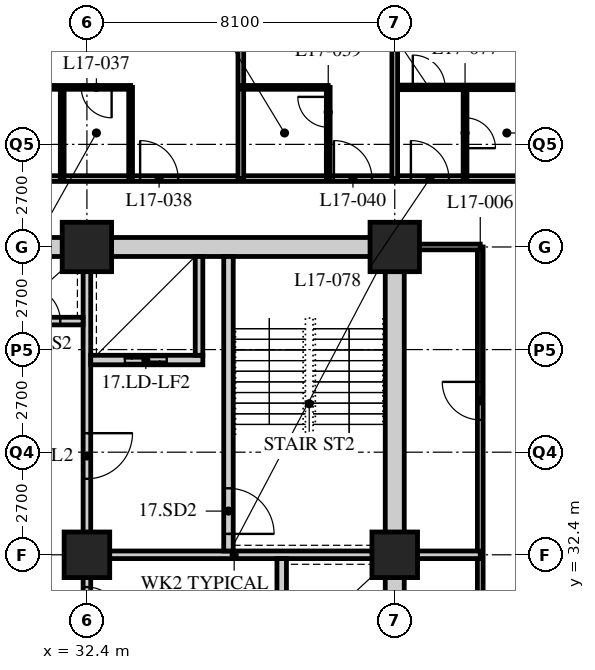
"""IFC4 building model, lengths in metres.
Left out: names, types, materials, properties, quantities, classifications, styles, units other than length and angle.
Written with IfcOpenShell. Run it as: python <this file> out.ifc"""

import sys

from ifc_helpers import new_model, si_unit, direction, frame, frame_2d, origin, origin_2d, place, context, subcontext, project, spatial, rectangle, hollow_rectangle, extrude, element, fill, save


model = new_model("IFC4")
c1 = context("Model", 3, precision=1e-05, world=origin(), true_north=direction((0.0, 1.0)))
c2 = subcontext(c1, "Body", "Model", "MODEL_VIEW")
j1 = project(units=[si_unit("LENGTHUNIT", "METRE"), si_unit("PLANEANGLEUNIT", "RADIAN")], contexts=[c1])
p1 = place(None, origin())
s1 = spatial("IfcSite", under=j1, at=p1, CompositionType="ELEMENT")
p2 = place(p1, origin())
s2 = spatial("IfcBuilding", under=s1, at=p2, CompositionType="ELEMENT")
p3 = place(p2, frame((0.0, 0.0, 70.4)))
s3 = spatial("IfcBuildingStorey", under=s2, at=p3, CompositionType="ELEMENT", Elevation=70.4)
p4 = place(p3, frame((32.4, 32.4, 0.0), z_axis=(0.0, 0.0, 1.0), x_axis=(1.0, 0.0, 0.0)))
e1 = element("IfcColumn", 1, at=p4, inside=s3, PredefinedType="COLUMN", context=c2, shape_type="SweptSolid", body=[
    extrude(hollow_rectangle(XDim=1.2, YDim=1.2, WallThickness=0.12, at=origin_2d()), origin(), (0.0, 0.0, 1.0), 3.4),
])
p5 = place(p3, frame((32.4, 40.5, 0.0), z_axis=(0.0, 0.0, 1.0), x_axis=(1.0, 0.0, 0.0)))
e2 = element("IfcColumn", 2, at=p5, inside=s3, PredefinedType="COLUMN", context=c2, shape_type="SweptSolid", body=[
    extrude(hollow_rectangle(XDim=1.3, YDim=1.3, WallThickness=0.13, at=origin_2d()), origin(), (0.0, 0.0, 1.0), 3.4),
])
p6 = place(p3, frame((40.5, 32.4, 0.0), z_axis=(0.0, 0.0, 1.0), x_axis=(1.0, 0.0, 0.0)))
e3 = element("IfcColumn", 3, at=p6, inside=s3, PredefinedType="COLUMN", context=c2, shape_type="SweptSolid", body=[
    extrude(hollow_rectangle(XDim=1.2, YDim=1.2, WallThickness=0.12, at=origin_2d()), origin(), (0.0, 0.0, 1.0), 3.4),
])
p7 = place(p3, frame((40.5, 40.5, 0.0), z_axis=(0.0, 0.0, 1.0), x_axis=(1.0, 0.0, 0.0)))
e4 = element("IfcColumn", 4, at=p7, inside=s3, PredefinedType="COLUMN", context=c2, shape_type="SweptSolid", body=[
    extrude(hollow_rectangle(XDim=1.3, YDim=1.3, WallThickness=0.13, at=origin_2d()), origin(), (0.0, 0.0, 1.0), 3.4),
])
p8 = place(p3, frame((8.1, 42.3, 0.0), z_axis=(0.0, 0.0, 1.0), x_axis=(1.0, 0.0, 0.0)))
e5 = element("IfcWall", 5, at=p8, inside=s3, PredefinedType="PARTITIONING", context=c2, shape_type="SweptSolid", body=[
    extrude(rectangle(XDim=36.45, YDim=0.15, at=frame_2d((18.225, 0.0))), origin(), (0.0, 0.0, 1.0), 3.19),
])
p9 = place(p8, frame((9.5, 0.0, 0.0)))
e6 = element("IfcOpeningElement", 6, at=p9, cuts=e5, PredefinedType="OPENING", context=c2, shape_type="SweptSolid", body=[
    extrude(rectangle(XDim=1.0, YDim=2.1, at=frame_2d((0.5, 1.05))), frame((0.0, 0.085, 0.0), z_axis=(0.0, -1.0, 0.0), x_axis=(1.0, 0.0, 0.0)), (0.0, 0.0, 1.0), 0.17),
])
p10 = place(p8, frame((14.6, 0.0, 0.0)))
e7 = element("IfcOpeningElement", 7, at=p10, cuts=e5, PredefinedType="OPENING", context=c2, shape_type="SweptSolid", body=[
    extrude(rectangle(XDim=1.0, YDim=2.1, at=frame_2d((0.5, 1.05))), frame((0.0, 0.085, 0.0), z_axis=(0.0, -1.0, 0.0), x_axis=(1.0, 0.0, 0.0)), (0.0, 0.0, 1.0), 0.17),
])
p11 = place(p8, frame((18.65, 0.0, 0.0)))
e8 = element("IfcOpeningElement", 8, at=p11, cuts=e5, PredefinedType="OPENING", context=c2, shape_type="SweptSolid", body=[
    extrude(rectangle(XDim=1.0, YDim=2.1, at=frame_2d((0.5, 1.05))), frame((0.0, 0.085, 0.0), z_axis=(0.0, -1.0, 0.0), x_axis=(1.0, 0.0, 0.0)), (0.0, 0.0, 1.0), 0.17),
])
p12 = place(p8, frame((25.7, 0.0, 0.0)))
e9 = element("IfcOpeningElement", 9, at=p12, cuts=e5, PredefinedType="OPENING", context=c2, shape_type="SweptSolid", body=[
    extrude(rectangle(XDim=1.0, YDim=2.1, at=frame_2d((0.5, 1.05))), frame((0.0, 0.085, 0.0), z_axis=(0.0, -1.0, 0.0), x_axis=(1.0, 0.0, 0.0)), (0.0, 0.0, 1.0), 0.17),
])
p13 = place(p8, frame((30.8, 0.0, 0.0)))
e10 = element("IfcOpeningElement", 10, at=p13, cuts=e5, PredefinedType="OPENING", context=c2, shape_type="SweptSolid", body=[
    extrude(rectangle(XDim=1.0, YDim=2.1, at=frame_2d((0.5, 1.05))), frame((0.0, 0.085, 0.0), z_axis=(0.0, -1.0, 0.0), x_axis=(1.0, 0.0, 0.0)), (0.0, 0.0, 1.0), 0.17),
])
p14 = place(p8, frame((32.825, 0.0, 0.0)))
e11 = element("IfcOpeningElement", 11, at=p14, cuts=e5, PredefinedType="OPENING", context=c2, shape_type="SweptSolid", body=[
    extrude(rectangle(XDim=1.0, YDim=2.1, at=frame_2d((0.5, 1.05))), frame((0.0, 0.085, 0.0), z_axis=(0.0, -1.0, 0.0), x_axis=(1.0, 0.0, 0.0)), (0.0, 0.0, 1.0), 0.17),
])
p15 = place(p8, frame((2.625, 0.0, 0.0)))
e12 = element("IfcOpeningElement", 12, at=p15, cuts=e5, PredefinedType="OPENING", context=c2, shape_type="SweptSolid", body=[
    extrude(rectangle(XDim=1.0, YDim=2.1, at=frame_2d((0.5, 1.05))), frame((0.0, 0.085, 0.0), z_axis=(0.0, -1.0, 0.0), x_axis=(1.0, 0.0, 0.0)), (0.0, 0.0, 1.0), 0.17),
])
p16 = place(p3, frame((42.75, 13.95, 0.0), z_axis=(0.0, 0.0, 1.0), x_axis=(0.0, 1.0, 0.0)))
e13 = element("IfcWall", 13, at=p16, inside=s3, PredefinedType="PARTITIONING", context=c2, shape_type="SweptSolid", body=[
    extrude(rectangle(XDim=26.55, YDim=0.15, at=frame_2d((13.275, 0.0))), origin(), (0.0, 0.0, 1.0), 3.19),
])
p17 = place(p16, frame((13.9, 0.0, 0.0)))
e14 = element("IfcOpeningElement", 14, at=p17, cuts=e13, PredefinedType="OPENING", context=c2, shape_type="SweptSolid", body=[
    extrude(rectangle(XDim=1.0, YDim=2.1, at=frame_2d((0.5, 1.05))), frame((0.0, 0.085, 0.0), z_axis=(0.0, -1.0, 0.0), x_axis=(1.0, 0.0, 0.0)), (0.0, 0.0, 1.0), 0.17),
])
p18 = place(p16, frame((22.0, 0.0, 0.0)))
e15 = element("IfcOpeningElement", 15, at=p18, cuts=e13, PredefinedType="OPENING", context=c2, shape_type="SweptSolid", body=[
    extrude(rectangle(XDim=1.0, YDim=2.1, at=frame_2d((0.5, 1.05))), frame((0.0, 0.085, 0.0), z_axis=(0.0, -1.0, 0.0), x_axis=(1.0, 0.0, 0.0)), (0.0, 0.0, 1.0), 0.17),
])
p19 = place(p3, frame((42.75, 40.5, 0.0), z_axis=(0.0, 0.0, 1.0), x_axis=(-1.0, 0.0, 0.0)))
e16 = element("IfcWall", 16, at=p19, inside=s3, PredefinedType="PARTITIONING", context=c2, shape_type="SweptSolid", body=[
    extrude(rectangle(XDim=2.05, YDim=0.15, at=frame_2d((1.025, 0.0))), origin(), (0.0, 0.0, 1.0), 2.578),
])
p20 = place(p3, frame((40.5, 32.4, 0.0), z_axis=(0.0, 0.0, 1.0), x_axis=(1.0, 0.0, 0.0)))
e17 = element("IfcWall", 17, at=p20, inside=s3, PredefinedType="SOLIDWALL", context=c2, shape_type="SweptSolid", body=[
    extrude(rectangle(XDim=2.25, YDim=0.2, at=frame_2d((1.125, 0.0))), origin(), (0.0, 0.0, 1.0), 2.578),
])
p21 = place(p3, frame((28.35, 44.7, 0.0), z_axis=(0.0, 0.0, 1.0), x_axis=(1.0, 0.0, 0.0)))
e18 = element("IfcWall", 18, at=p21, inside=s3, PredefinedType="PARTITIONING", context=c2, shape_type="SweptSolid", body=[
    extrude(rectangle(XDim=5.2, YDim=0.1, at=frame_2d((2.6, 0.0))), origin(), (0.0, 0.0, 1.0), 3.19),
])
p22 = place(p21, frame((1.3, 0.0, 0.0)))
e19 = element("IfcOpeningElement", 19, at=p22, cuts=e18, PredefinedType="OPENING", context=c2, shape_type="SweptSolid", body=[
    extrude(rectangle(XDim=0.8, YDim=2.1, at=frame_2d((0.4, 1.05))), frame((0.0, 0.06, 0.0), z_axis=(0.0, -1.0, 0.0), x_axis=(1.0, 0.0, 0.0)), (0.0, 0.0, 1.0), 0.12),
])
p23 = place(p21, frame((3.9, 0.0, 0.0)))
e20 = element("IfcOpeningElement", 20, at=p23, cuts=e18, PredefinedType="OPENING", context=c2, shape_type="SweptSolid", body=[
    extrude(rectangle(XDim=0.8, YDim=2.1, at=frame_2d((0.4, 1.05))), frame((0.0, 0.06, 0.0), z_axis=(0.0, -1.0, 0.0), x_axis=(1.0, 0.0, 0.0)), (0.0, 0.0, 1.0), 0.12),
])
for number, where, z_axis, x_axis in (
    (21, (31.75, 42.3, 0.0), (0.0, 0.0, 1.0), (0.0, 1.0, 0.0)),
    (22, (33.55, 42.3, 0.0), (0.0, 0.0, 1.0), (0.0, 1.0, 0.0)),
):
    element("IfcWall", number, at=place(p3, frame(where, z_axis=z_axis, x_axis=x_axis)), inside=s3, PredefinedType="PARTITIONING", context=c2, shape_type="SweptSolid", body=[
        extrude(rectangle(XDim=2.4, YDim=0.1, at=frame_2d((1.2, 0.0))), origin(), (0.0, 0.0, 1.0), 3.19),
    ])
p24 = place(p3, frame((36.45, 42.3, 0.0), z_axis=(0.0, 0.0, 1.0), x_axis=(0.0, 1.0, 0.0)))
e23 = element("IfcWall", 23, at=p24, inside=s3, PredefinedType="PARTITIONING", context=c2, shape_type="SweptSolid", body=[
    extrude(rectangle(XDim=6.0, YDim=0.15, at=frame_2d((3.0, 0.0))), origin(), (0.0, 0.0, 1.0), 3.19),
])
p25 = place(p3, frame((36.45, 44.7, 0.0), z_axis=(0.0, 0.0, 1.0), x_axis=(1.0, 0.0, 0.0)))
e24 = element("IfcWall", 24, at=p25, inside=s3, PredefinedType="PARTITIONING", context=c2, shape_type="SweptSolid", body=[
    extrude(rectangle(XDim=2.3, YDim=0.1, at=frame_2d((1.15, 0.0))), origin(), (0.0, 0.0, 1.0), 3.19),
])
p26 = place(p3, frame((38.75, 42.3, 0.0), z_axis=(0.0, 0.0, 1.0), x_axis=(0.0, 1.0, 0.0)))
e25 = element("IfcWall", 25, at=p26, inside=s3, PredefinedType="PARTITIONING", context=c2, shape_type="SweptSolid", body=[
    extrude(rectangle(XDim=2.4, YDim=0.1, at=frame_2d((1.2, 0.0))), origin(), (0.0, 0.0, 1.0), 3.19),
])
p27 = place(p26, frame((1.35, 0.0, 0.0)))
e26 = element("IfcOpeningElement", 26, at=p27, cuts=e25, PredefinedType="OPENING", context=c2, shape_type="SweptSolid", body=[
    extrude(rectangle(XDim=0.8, YDim=2.1, at=frame_2d((0.4, 1.05))), frame((0.0, 0.06, 0.0), z_axis=(0.0, -1.0, 0.0), x_axis=(1.0, 0.0, 0.0)), (0.0, 0.0, 1.0), 0.12),
])
p28 = place(p3, frame((40.5, 44.7, 0.0), z_axis=(0.0, 0.0, 1.0), x_axis=(1.0, 0.0, 0.0)))
e27 = element("IfcWall", 27, at=p28, inside=s3, PredefinedType="PARTITIONING", context=c2, shape_type="SweptSolid", body=[
    extrude(rectangle(XDim=4.05, YDim=0.12, at=frame_2d((2.025, 0.0))), origin(), (0.0, 0.0, 1.0), 3.19),
])
p29 = place(p28, frame((0.475, 0.0, 0.0)))
e28 = element("IfcOpeningElement", 28, at=p29, cuts=e27, PredefinedType="OPENING", context=c2, shape_type="SweptSolid", body=[
    extrude(rectangle(XDim=0.85, YDim=2.1, at=frame_2d((0.425, 1.05))), frame((0.0, 0.07, 0.0), z_axis=(0.0, -1.0, 0.0), x_axis=(1.0, 0.0, 0.0)), (0.0, 0.0, 1.0), 0.14),
])
p30 = place(p3, frame((42.35, 42.3, 0.0), z_axis=(0.0, 0.0, 1.0), x_axis=(0.0, 1.0, 0.0)))
e29 = element("IfcWall", 29, at=p30, inside=s3, PredefinedType="PARTITIONING", context=c2, shape_type="SweptSolid", body=[
    extrude(rectangle(XDim=2.4, YDim=0.1, at=frame_2d((1.2, 0.0))), origin(), (0.0, 0.0, 1.0), 3.19),
])
p31 = place(p30, frame((0.8, 0.0, 0.0)))
e30 = element("IfcOpeningElement", 30, at=p31, cuts=e29, PredefinedType="OPENING", context=c2, shape_type="SweptSolid", body=[
    extrude(rectangle(XDim=0.8, YDim=2.1, at=frame_2d((0.4, 1.05))), frame((0.0, 0.06, 0.0), z_axis=(0.0, -1.0, 0.0), x_axis=(1.0, 0.0, 0.0)), (0.0, 0.0, 1.0), 0.12),
])
p32 = place(p3, frame((40.5, 42.3, 0.0), z_axis=(0.0, 0.0, 1.0), x_axis=(0.0, 1.0, 0.0)))
e31 = element("IfcWall", 31, at=p32, inside=s3, PredefinedType="PARTITIONING", context=c2, shape_type="SweptSolid", body=[
    extrude(rectangle(XDim=6.0, YDim=0.15, at=frame_2d((3.0, 0.0))), origin(), (0.0, 0.0, 1.0), 2.578),
])
p33 = place(p3, frame((15.95, 40.5, 0.0), z_axis=(0.0, 0.0, 1.0), x_axis=(1.0, 0.0, 0.0)))
e32 = element("IfcWall", 32, at=p33, inside=s3, PredefinedType="SOLIDWALL", context=c2, shape_type="SweptSolid", body=[
    extrude(rectangle(XDim=24.8, YDim=0.5, at=frame_2d((12.4, 0.0))), origin(), (0.0, 0.0, 1.0), 2.54),
])
p34 = place(p33, frame((11.5, 0.0, 0.0)))
e33 = element("IfcOpeningElement", 33, at=p34, cuts=e32, PredefinedType="OPENING", context=c2, shape_type="SweptSolid", body=[
    extrude(rectangle(XDim=1.8, YDim=2.4, at=frame_2d((0.9, 1.2))), frame((0.0, 0.26, 0.0), z_axis=(0.0, -1.0, 0.0), x_axis=(1.0, 0.0, 0.0)), (0.0, 0.0, 1.0), 0.52),
])
p35 = place(p3, frame((40.5, 24.55, 0.0), z_axis=(0.0, 0.0, 1.0), x_axis=(0.0, 1.0, 0.0)))
e34 = element("IfcWall", 34, at=p35, inside=s3, PredefinedType="SOLIDWALL", context=c2, shape_type="SweptSolid", body=[
    extrude(rectangle(XDim=15.7, YDim=0.5, at=frame_2d((7.85, 0.0))), origin(), (0.0, 0.0, 1.0), 2.578),
])
p36 = place(p3, frame((32.3, 32.4, 0.0), z_axis=(0.0, 0.0, 1.0), x_axis=(1.0, 0.0, 0.0)))
e35 = element("IfcWall", 35, at=p36, inside=s3, PredefinedType="SOLIDWALL", context=c2, shape_type="SweptSolid", body=[
    extrude(rectangle(XDim=7.95, YDim=0.2, at=frame_2d((3.975, 0.0))), origin(), (0.0, 0.0, 1.0), 2.578),
])
p37 = place(p3, frame((32.4, 32.5, 0.0), z_axis=(0.0, 0.0, 1.0), x_axis=(0.0, 1.0, 0.0)))
e36 = element("IfcWall", 36, at=p37, inside=s3, PredefinedType="SOLIDWALL", context=c2, shape_type="SweptSolid", body=[
    extrude(rectangle(XDim=7.75, YDim=0.2, at=frame_2d((3.875, 0.0))), origin(), (0.0, 0.0, 1.0), 2.578),
])
p38 = place(p37, frame((1.9, 0.0, 0.0)))
e37 = element("IfcOpeningElement", 37, at=p38, cuts=e36, PredefinedType="OPENING", context=c2, shape_type="SweptSolid", body=[
    extrude(rectangle(XDim=1.2, YDim=2.1, at=frame_2d((0.6, 1.05))), frame((0.0, 0.11, 0.0), z_axis=(0.0, -1.0, 0.0), x_axis=(1.0, 0.0, 0.0)), (0.0, 0.0, 1.0), 0.22),
])
p39 = place(p3, frame((37.525, 24.55, 0.0), z_axis=(0.0, 0.0, 1.0), x_axis=(0.0, 1.0, 0.0)))
e38 = element("IfcWall", 38, at=p39, inside=s3, PredefinedType="SOLIDWALL", context=c2, shape_type="SweptSolid", body=[
    extrude(rectangle(XDim=7.75, YDim=0.25, at=frame_2d((3.875, 0.0))), origin(), (0.0, 0.0, 1.0), 3.19),
])
p40 = place(p3, frame((36.125, 32.5, 0.0), z_axis=(0.0, 0.0, 1.0), x_axis=(0.0, 1.0, 0.0)))
e39 = element("IfcWall", 39, at=p40, inside=s3, PredefinedType="SOLIDWALL", context=c2, shape_type="SweptSolid", body=[
    extrude(rectangle(XDim=7.75, YDim=0.25, at=frame_2d((3.875, 0.0))), origin(), (0.0, 0.0, 1.0), 3.19),
])
p41 = place(p40, frame((0.45, 0.0, 0.0)))
e40 = element("IfcOpeningElement", 40, at=p41, cuts=e39, PredefinedType="OPENING", context=c2, shape_type="SweptSolid", body=[
    extrude(rectangle(XDim=1.2, YDim=2.1, at=frame_2d((0.6, 1.05))), frame((0.0, 0.135, 0.0), z_axis=(0.0, -1.0, 0.0), x_axis=(1.0, 0.0, 0.0)), (0.0, 0.0, 1.0), 0.27),
])
p42 = place(p3, frame((32.5, 37.525, 0.0), z_axis=(0.0, 0.0, 1.0), x_axis=(1.0, 0.0, 0.0)))
e41 = element("IfcWall", 41, at=p42, inside=s3, PredefinedType="SOLIDWALL", context=c2, shape_type="SweptSolid", body=[
    extrude(rectangle(XDim=2.95, YDim=0.25, at=frame_2d((1.475, 0.0))), origin(), (0.0, 0.0, 1.0), 3.19),
])
p43 = place(p42, frame((0.9, 0.0, 0.0)))
e42 = element("IfcOpeningElement", 42, at=p43, cuts=e41, PredefinedType="OPENING", context=c2, shape_type="SweptSolid", body=[
    extrude(rectangle(XDim=1.1, YDim=2.4, at=frame_2d((0.55, 1.2))), frame((0.0, 0.135, 0.0), z_axis=(0.0, -1.0, 0.0), x_axis=(1.0, 0.0, 0.0)), (0.0, 0.0, 1.0), 0.27),
])
p44 = place(p3, frame((35.35, 37.65, 0.0), z_axis=(0.0, 0.0, 1.0), x_axis=(0.0, 1.0, 0.0)))
e43 = element("IfcWall", 43, at=p44, inside=s3, PredefinedType="SOLIDWALL", context=c2, shape_type="SweptSolid", body=[
    extrude(rectangle(XDim=2.6, YDim=0.2, at=frame_2d((1.3, 0.0))), origin(), (0.0, 0.0, 1.0), 3.19),
])
p45 = place(p3, frame((30.15, 38.55, 0.0), z_axis=(0.0, 0.0, 1.0), x_axis=(1.0, 0.0, 0.0)))
e44 = element("IfcWall", 44, at=p45, inside=s3, PredefinedType="SOLIDWALL", context=c2, shape_type="SweptSolid", body=[
    extrude(rectangle(XDim=2.15, YDim=0.2, at=frame_2d((1.075, 0.0))), origin(), (0.0, 0.0, 1.0), 3.19),
])
p46 = place(p45, frame((0.65, 0.0, 0.0)))
e45 = element("IfcOpeningElement", 45, at=p46, cuts=e44, PredefinedType="OPENING", context=c2, shape_type="SweptSolid", body=[
    extrude(rectangle(XDim=0.9, YDim=2.1, at=frame_2d((0.45, 1.05))), frame((0.0, 0.11, 0.0), z_axis=(0.0, -1.0, 0.0), x_axis=(1.0, 0.0, 0.0)), (0.0, 0.0, 1.0), 0.22),
])
p47 = place(p3, frame((32.4, 24.55, 0.0), z_axis=(0.0, 0.0, 1.0), x_axis=(0.0, 1.0, 0.0)))
e46 = element("IfcWall", 46, at=p47, inside=s3, PredefinedType="PARTITIONING", context=c2, shape_type="SweptSolid", body=[
    extrude(rectangle(XDim=7.75, YDim=0.2, at=frame_2d((3.875, 0.0))), origin(), (0.0, 0.0, 1.0), 2.578),
])
p48 = place(p47, frame((1.0, 0.0, 0.0)))
e47 = element("IfcOpeningElement", 47, at=p48, cuts=e46, PredefinedType="OPENING", context=c2, shape_type="SweptSolid", body=[
    extrude(rectangle(XDim=1.0, YDim=2.1, at=frame_2d((0.5, 1.05))), frame((0.0, 0.11, 0.0), z_axis=(0.0, -1.0, 0.0), x_axis=(1.0, 0.0, 0.0)), (0.0, 0.0, 1.0), 0.22),
])
p49 = place(p47, frame((3.925, 0.0, 0.0)))
e48 = element("IfcOpeningElement", 48, at=p49, cuts=e46, PredefinedType="OPENING", context=c2, shape_type="SweptSolid", body=[
    extrude(rectangle(XDim=1.0, YDim=2.1, at=frame_2d((0.5, 1.05))), frame((0.0, 0.11, 0.0), z_axis=(0.0, -1.0, 0.0), x_axis=(1.0, 0.0, 0.0)), (0.0, 0.0, 1.0), 0.22),
])
p50 = place(p47, frame((6.1, 0.0, 0.0)))
e49 = element("IfcOpeningElement", 49, at=p50, cuts=e46, PredefinedType="OPENING", context=c2, shape_type="SweptSolid", body=[
    extrude(rectangle(XDim=0.9, YDim=2.1, at=frame_2d((0.45, 1.05))), frame((0.0, 0.11, 0.0), z_axis=(0.0, -1.0, 0.0), x_axis=(1.0, 0.0, 0.0)), (0.0, 0.0, 1.0), 0.22),
])
p51 = place(p18, origin())
e50 = element("IfcDoor", 50, at=p51, inside=s3, OperationType="SINGLE_SWING_RIGHT", PredefinedType="DOOR", context=c2, shape_type="SweptSolid", body=[
    extrude(rectangle(XDim=1.0, YDim=2.1, at=frame_2d((0.5, 1.05))), frame((0.0, 0.025, 0.0), z_axis=(0.0, -1.0, 0.0), x_axis=(1.0, 0.0, 0.0)), (0.0, 0.0, 1.0), 0.05),
])
fill(e15, e50)
p52 = place(p23, origin())
e51 = element("IfcDoor", 51, at=p52, inside=s3, OperationType="SINGLE_SWING_LEFT", PredefinedType="DOOR", context=c2, shape_type="SweptSolid", body=[
    extrude(rectangle(XDim=0.8, YDim=2.1, at=frame_2d((0.4, 1.05))), frame((0.0, 0.025, 0.0), z_axis=(0.0, -1.0, 0.0), x_axis=(1.0, 0.0, 0.0)), (0.0, 0.0, 1.0), 0.05),
])
fill(e20, e51)
p53 = place(p12, origin())
e52 = element("IfcDoor", 52, at=p53, inside=s3, OperationType="SINGLE_SWING_LEFT", PredefinedType="DOOR", context=c2, shape_type="SweptSolid", body=[
    extrude(rectangle(XDim=1.0, YDim=2.1, at=frame_2d((0.5, 1.05))), frame((0.0, 0.025, 0.0), z_axis=(0.0, -1.0, 0.0), x_axis=(1.0, 0.0, 0.0)), (0.0, 0.0, 1.0), 0.05),
])
fill(e9, e52)
p54 = place(p27, origin())
e53 = element("IfcDoor", 53, at=p54, inside=s3, OperationType="SINGLE_SWING_RIGHT", PredefinedType="DOOR", context=c2, shape_type="SweptSolid", body=[
    extrude(rectangle(XDim=0.8, YDim=2.1, at=frame_2d((0.4, 1.05))), frame((0.0, 0.025, 0.0), z_axis=(0.0, -1.0, 0.0), x_axis=(1.0, 0.0, 0.0)), (0.0, 0.0, 1.0), 0.05),
])
fill(e26, e53)
p55 = place(p13, origin())
e54 = element("IfcDoor", 54, at=p55, inside=s3, OperationType="SINGLE_SWING_LEFT", PredefinedType="DOOR", context=c2, shape_type="SweptSolid", body=[
    extrude(rectangle(XDim=1.0, YDim=2.1, at=frame_2d((0.5, 1.05))), frame((0.0, 0.025, 0.0), z_axis=(0.0, -1.0, 0.0), x_axis=(1.0, 0.0, 0.0)), (0.0, 0.0, 1.0), 0.05),
])
fill(e10, e54)
p56 = place(p31, origin())
e55 = element("IfcDoor", 55, at=p56, inside=s3, OperationType="SINGLE_SWING_RIGHT", PredefinedType="DOOR", context=c2, shape_type="SweptSolid", body=[
    extrude(rectangle(XDim=0.8, YDim=2.1, at=frame_2d((0.4, 1.05))), frame((0.0, 0.025, 0.0), z_axis=(0.0, -1.0, 0.0), x_axis=(1.0, 0.0, 0.0)), (0.0, 0.0, 1.0), 0.05),
])
fill(e30, e55)
p57 = place(p14, origin())
e56 = element("IfcDoor", 56, at=p57, inside=s3, OperationType="SINGLE_SWING_LEFT", PredefinedType="DOOR", context=c2, shape_type="SweptSolid", body=[
    extrude(rectangle(XDim=1.0, YDim=2.1, at=frame_2d((0.5, 1.05))), frame((0.0, 0.025, 0.0), z_axis=(0.0, -1.0, 0.0), x_axis=(1.0, 0.0, 0.0)), (0.0, 0.0, 1.0), 0.05),
])
fill(e11, e56)
p58 = place(p29, origin())
e57 = element("IfcDoor", 57, at=p58, inside=s3, OperationType="SINGLE_SWING_LEFT", PredefinedType="DOOR", context=c2, shape_type="SweptSolid", body=[
    extrude(rectangle(XDim=0.85, YDim=2.1, at=frame_2d((0.425, 1.05))), frame((0.0, 0.025, 0.0), z_axis=(0.0, -1.0, 0.0), x_axis=(1.0, 0.0, 0.0)), (0.0, 0.0, 1.0), 0.05),
])
fill(e28, e57)
p59 = place(p50, origin())
e58 = element("IfcDoor", 58, at=p59, inside=s3, OperationType="SINGLE_SWING_RIGHT", PredefinedType="DOOR", context=c2, shape_type="SweptSolid", body=[
    extrude(rectangle(XDim=0.9, YDim=2.1, at=frame_2d((0.45, 1.05))), frame((0.0, 0.025, 0.0), z_axis=(0.0, -1.0, 0.0), x_axis=(1.0, 0.0, 0.0)), (0.0, 0.0, 1.0), 0.05),
])
fill(e49, e58)
p60 = place(p41, origin())
e59 = element("IfcDoor", 59, at=p60, inside=s3, OperationType="SINGLE_SWING_RIGHT", PredefinedType="DOOR", context=c2, shape_type="SweptSolid", body=[
    extrude(rectangle(XDim=1.2, YDim=2.1, at=frame_2d((0.6, 1.05))), frame((0.0, 0.025, 0.0), z_axis=(0.0, -1.0, 0.0), x_axis=(1.0, 0.0, 0.0)), (0.0, 0.0, 1.0), 0.05),
])
fill(e40, e59)
p61 = place(p38, origin())
e60 = element("IfcDoor", 60, at=p61, inside=s3, OperationType="SINGLE_SWING_LEFT", PredefinedType="DOOR", context=c2, shape_type="SweptSolid", body=[
    extrude(rectangle(XDim=1.2, YDim=2.1, at=frame_2d((0.6, 1.05))), frame((0.0, 0.025, 0.0), z_axis=(0.0, -1.0, 0.0), x_axis=(1.0, 0.0, 0.0)), (0.0, 0.0, 1.0), 0.05),
])
fill(e37, e60)
p62 = place(p46, origin())
e61 = element("IfcDoor", 61, at=p62, inside=s3, OperationType="SINGLE_SWING_LEFT", PredefinedType="DOOR", context=c2, shape_type="SweptSolid", body=[
    extrude(rectangle(XDim=0.9, YDim=2.1, at=frame_2d((0.45, 1.05))), frame((0.0, 0.025, 0.0), z_axis=(0.0, -1.0, 0.0), x_axis=(1.0, 0.0, 0.0)), (0.0, 0.0, 1.0), 0.05),
])
fill(e45, e61)
p63 = place(p43, origin())
e62 = element("IfcDoor", 62, at=p63, inside=s3, OperationType="DOUBLE_DOOR_SLIDING", PredefinedType="DOOR", context=c2, shape_type="SweptSolid", body=[
    extrude(rectangle(XDim=1.1, YDim=2.4, at=frame_2d((0.55, 1.2))), frame((0.0, 0.025, 0.0), z_axis=(0.0, -1.0, 0.0), x_axis=(1.0, 0.0, 0.0)), (0.0, 0.0, 1.0), 0.05),
])
fill(e42, e62)
save(model, sys.argv[1])
